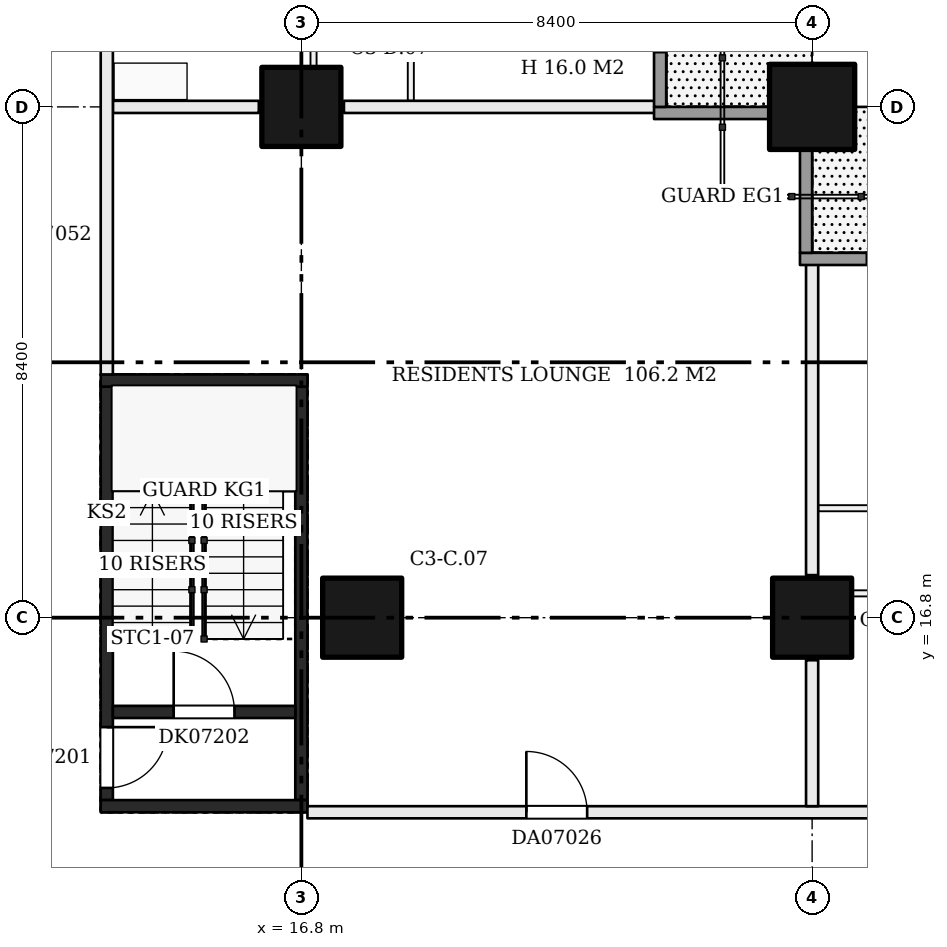
"""IFC4 building model, lengths in metres.
Left out: names, types, materials, properties, quantities, classifications, styles, units other than length and angle.
Written with IfcOpenShell. Run it as: python <this file> out.ifc"""

import sys

from ifc_helpers import new_model, si_unit, direction, frame, frame_2d, origin, origin_2d, place, context, subcontext, project, spatial, rectangle, extrude, element, fill, save


model = new_model("IFC4")
c1 = context("Model", 3, precision=1e-05, world=origin(), true_north=direction((0.0, 1.0)))
c2 = subcontext(c1, "Body", "Model", "MODEL_VIEW")
j1 = project(units=[si_unit("LENGTHUNIT", "METRE"), si_unit("PLANEANGLEUNIT", "RADIAN")], contexts=[c1])
p1 = place(None, origin())
s1 = spatial("IfcSite", under=j1, at=p1, CompositionType="ELEMENT")
p2 = place(p1, origin())
s2 = spatial("IfcBuilding", under=s1, at=p2, CompositionType="ELEMENT")
p3 = place(p2, frame((0.0, 0.0, 35.7)))
s3 = spatial("IfcBuildingStorey", under=s2, at=p3, CompositionType="ELEMENT", Elevation=35.7)
for number, where, z_axis, x_axis in (
    (1, (17.8, 16.8, 0.0), (0.0, 0.0, 1.0), (1.0, 0.0, 0.0)),
    (2, (16.8, 25.2, 0.0), (0.0, 0.0, 1.0), (1.0, 0.0, 0.0)),
    (3, (25.2, 16.8, 0.0), (0.0, 0.0, 1.0), (1.0, 0.0, 0.0)),
):
    element("IfcColumn", number, at=place(p3, frame(where, z_axis=z_axis, x_axis=x_axis)), inside=s3, PredefinedType="COLUMN", context=c2, shape_type="SweptSolid", body=[
        extrude(rectangle(XDim=1.3, YDim=1.3, at=origin_2d()), origin(), (0.0, 0.0, 1.0), 3.22),
    ])
p4 = place(p3, frame((25.2, 25.2, 0.0), z_axis=(0.0, 0.0, 1.0), x_axis=(1.0, 0.0, 0.0)))
e4 = element("IfcColumn", 4, at=p4, inside=s3, PredefinedType="COLUMN", context=c2, shape_type="SweptSolid", body=[
    extrude(rectangle(XDim=1.4, YDim=1.4, at=origin_2d()), origin(), (0.0, 0.0, 1.0), 3.22),
])
p5 = place(p3, frame((13.6, 13.8, 0.0), z_axis=(0.0, 0.0, 1.0), x_axis=(0.0, 1.0, 0.0)))
e5 = element("IfcWall", 5, at=p5, inside=s3, PredefinedType="SHEAR", context=c2, shape_type="SweptSolid", body=[
    extrude(rectangle(XDim=6.8, YDim=0.2, at=frame_2d((3.4, 0.0))), origin(), (0.0, 0.0, 1.0), 3.22),
])
p6 = place(p5, frame((0.2, 0.0, 0.0)))
e6 = element("IfcOpeningElement", 6, at=p6, cuts=e5, PredefinedType="OPENING", context=c2, shape_type="SweptSolid", body=[
    extrude(rectangle(XDim=1.0, YDim=2.1, at=frame_2d((0.5, 1.05))), frame((0.0, 0.11, 0.0), z_axis=(0.0, -1.0, 0.0), x_axis=(1.0, 0.0, 0.0)), (0.0, 0.0, 1.0), 0.22),
])
p7 = place(p3, frame((16.8, 13.8, 0.0), z_axis=(0.0, 0.0, 1.0), x_axis=(0.0, 1.0, 0.0)))
e7 = element("IfcWall", 7, at=p7, inside=s3, PredefinedType="SHEAR", context=c2, shape_type="SweptSolid", body=[
    extrude(rectangle(XDim=6.8, YDim=0.2, at=frame_2d((3.4, 0.0))), origin(), (0.0, 0.0, 1.0), 3.22),
])
for number, where, z_axis, x_axis in (
    (8, (13.5, 13.7, 0.0), (0.0, 0.0, 1.0), (1.0, 0.0, 0.0)),
    (9, (13.5, 20.7, 0.0), (0.0, 0.0, 1.0), (1.0, 0.0, 0.0)),
):
    element("IfcWall", number, at=place(p3, frame(where, z_axis=z_axis, x_axis=x_axis)), inside=s3, PredefinedType="SHEAR", context=c2, shape_type="SweptSolid", body=[
        extrude(rectangle(XDim=3.4, YDim=0.2, at=frame_2d((1.7, 0.0))), origin(), (0.0, 0.0, 1.0), 3.22),
    ])
p8 = place(p3, frame((13.7, 15.25, 0.0), z_axis=(0.0, 0.0, 1.0), x_axis=(1.0, 0.0, 0.0)))
e10 = element("IfcWall", 10, at=p8, inside=s3, PredefinedType="SHEAR", context=c2, shape_type="SweptSolid", body=[
    extrude(rectangle(XDim=3.0, YDim=0.2, at=frame_2d((1.5, 0.0))), origin(), (0.0, 0.0, 1.0), 3.22),
])
p9 = place(p8, frame((1.0, 0.0, 0.0)))
e11 = element("IfcOpeningElement", 11, at=p9, cuts=e10, PredefinedType="OPENING", context=c2, shape_type="SweptSolid", body=[
    extrude(rectangle(XDim=1.0, YDim=2.1, at=frame_2d((0.5, 1.05))), frame((0.0, 0.11, 0.0), z_axis=(0.0, -1.0, 0.0), x_axis=(1.0, 0.0, 0.0)), (0.0, 0.0, 1.0), 0.22),
])
p10 = place(p3, frame((16.9, 13.6, 0.0), z_axis=(0.0, 0.0, 1.0), x_axis=(1.0, 0.0, 0.0)))
e12 = element("IfcWall", 12, at=p10, inside=s3, PredefinedType="PARTITIONING", context=c2, shape_type="SweptSolid", body=[
    extrude(rectangle(XDim=25.1, YDim=0.2, at=frame_2d((12.55, 0.0))), origin(), (0.0, 0.0, 1.0), 3.22),
])
p11 = place(p10, frame((9.7, 0.0, 0.0)))
e13 = element("IfcOpeningElement", 13, at=p11, cuts=e12, PredefinedType="OPENING", context=c2, shape_type="SweptSolid", body=[
    extrude(rectangle(XDim=1.0, YDim=2.1, at=frame_2d((0.5, 1.05))), frame((0.0, 0.11, 0.0), z_axis=(0.0, -1.0, 0.0), x_axis=(1.0, 0.0, 0.0)), (0.0, 0.0, 1.0), 0.22),
])
p12 = place(p10, frame((23.64, 0.0, 0.0)))
e14 = element("IfcOpeningElement", 14, at=p12, cuts=e12, PredefinedType="OPENING", context=c2, shape_type="SweptSolid", body=[
    extrude(rectangle(XDim=1.0, YDim=2.1, at=frame_2d((0.5, 1.05))), frame((0.0, 0.11, 0.0), z_axis=(0.0, -1.0, 0.0), x_axis=(1.0, 0.0, 0.0)), (0.0, 0.0, 1.0), 0.22),
])
p13 = place(p10, frame((3.6, 0.0, 0.0)))
e15 = element("IfcOpeningElement", 15, at=p13, cuts=e12, PredefinedType="OPENING", context=c2, shape_type="SweptSolid", body=[
    extrude(rectangle(XDim=1.0, YDim=2.1, at=frame_2d((0.5, 1.05))), frame((0.0, 0.11, 0.0), z_axis=(0.0, -1.0, 0.0), x_axis=(1.0, 0.0, 0.0)), (0.0, 0.0, 1.0), 0.22),
])
p14 = place(p3, frame((25.3, 17.2, 0.0), z_axis=(0.0, 0.0, 1.0), x_axis=(1.0, 0.0, 0.0)))
e16 = element("IfcWall", 16, at=p14, inside=s3, PredefinedType="PARTITIONING", context=c2, shape_type="SweptSolid", body=[
    extrude(rectangle(XDim=12.4, YDim=0.1, at=frame_2d((6.2, 0.0))), origin(), (0.0, 0.0, 1.0), 3.22),
])
p15 = place(p14, frame((1.4, 0.0, 0.0)))
e17 = element("IfcOpeningElement", 17, at=p15, cuts=e16, PredefinedType="OPENING", context=c2, shape_type="SweptSolid", body=[
    extrude(rectangle(XDim=0.9, YDim=2.1, at=frame_2d((0.45, 1.05))), frame((0.0, 0.06, 0.0), z_axis=(0.0, -1.0, 0.0), x_axis=(1.0, 0.0, 0.0)), (0.0, 0.0, 1.0), 0.12),
])
p16 = place(p14, frame((5.667, 0.0, 0.0)))
e18 = element("IfcOpeningElement", 18, at=p16, cuts=e16, PredefinedType="OPENING", context=c2, shape_type="SweptSolid", body=[
    extrude(rectangle(XDim=0.9, YDim=2.1, at=frame_2d((0.45, 1.05))), frame((0.0, 0.06, 0.0), z_axis=(0.0, -1.0, 0.0), x_axis=(1.0, 0.0, 0.0)), (0.0, 0.0, 1.0), 0.12),
])
p17 = place(p14, frame((10.033, 0.0, 0.0)))
e19 = element("IfcOpeningElement", 19, at=p17, cuts=e16, PredefinedType="OPENING", context=c2, shape_type="SweptSolid", body=[
    extrude(rectangle(XDim=0.9, YDim=2.1, at=frame_2d((0.45, 1.05))), frame((0.0, 0.06, 0.0), z_axis=(0.0, -1.0, 0.0), x_axis=(1.0, 0.0, 0.0)), (0.0, 0.0, 1.0), 0.12),
])
p18 = place(p3, frame((25.3, 18.6, 0.0), z_axis=(0.0, 0.0, 1.0), x_axis=(1.0, 0.0, 0.0)))
e20 = element("IfcWall", 20, at=p18, inside=s3, PredefinedType="PARTITIONING", context=c2, shape_type="SweptSolid", body=[
    extrude(rectangle(XDim=12.4, YDim=0.1, at=frame_2d((6.2, 0.0))), origin(), (0.0, 0.0, 1.0), 3.22),
])
p19 = place(p18, frame((1.5, 0.0, 0.0)))
e21 = element("IfcOpeningElement", 21, at=p19, cuts=e20, PredefinedType="OPENING", context=c2, shape_type="SweptSolid", body=[
    extrude(rectangle(XDim=0.9, YDim=2.1, at=frame_2d((0.45, 1.05))), frame((0.0, 0.06, 0.0), z_axis=(0.0, -1.0, 0.0), x_axis=(1.0, 0.0, 0.0)), (0.0, 0.0, 1.0), 0.12),
])
p20 = place(p18, frame((5.7, 0.0, 0.0)))
e22 = element("IfcOpeningElement", 22, at=p20, cuts=e20, PredefinedType="OPENING", context=c2, shape_type="SweptSolid", body=[
    extrude(rectangle(XDim=0.9, YDim=2.1, at=frame_2d((0.45, 1.05))), frame((0.0, 0.06, 0.0), z_axis=(0.0, -1.0, 0.0), x_axis=(1.0, 0.0, 0.0)), (0.0, 0.0, 1.0), 0.12),
])
p21 = place(p18, frame((9.9, 0.0, 0.0)))
e23 = element("IfcOpeningElement", 23, at=p21, cuts=e20, PredefinedType="OPENING", context=c2, shape_type="SweptSolid", body=[
    extrude(rectangle(XDim=0.9, YDim=2.1, at=frame_2d((0.45, 1.05))), frame((0.0, 0.06, 0.0), z_axis=(0.0, -1.0, 0.0), x_axis=(1.0, 0.0, 0.0)), (0.0, 0.0, 1.0), 0.12),
])
p22 = place(p3, frame((13.7, 25.2, 0.0), z_axis=(0.0, 0.0, 1.0), x_axis=(1.0, 0.0, 0.0)))
e24 = element("IfcWall", 24, at=p22, inside=s3, PredefinedType="PARTITIONING", context=c2, shape_type="SweptSolid", body=[
    extrude(rectangle(XDim=2.4, YDim=0.2, at=frame_2d((1.2, 0.0))), origin(), (0.0, 0.0, 1.0), 3.22),
])
p23 = place(p3, frame((17.5, 25.2, 0.0), z_axis=(0.0, 0.0, 1.0), x_axis=(1.0, 0.0, 0.0)))
e25 = element("IfcWall", 25, at=p23, inside=s3, PredefinedType="PARTITIONING", context=c2, shape_type="SweptSolid", body=[
    extrude(rectangle(XDim=5.2, YDim=0.2, at=frame_2d((2.6, 0.0))), origin(), (0.0, 0.0, 1.0), 3.22),
])
p24 = place(p3, frame((13.6, 20.8, 0.0), z_axis=(0.0, 0.0, 1.0), x_axis=(0.0, 1.0, 0.0)))
e26 = element("IfcWall", 26, at=p24, inside=s3, PredefinedType="PARTITIONING", context=c2, shape_type="SweptSolid", body=[
    extrude(rectangle(XDim=21.2, YDim=0.2, at=frame_2d((10.6, 0.0))), origin(), (0.0, 0.0, 1.0), 3.22),
])
p25 = place(p24, frame((10.467, 0.0, 0.0)))
e27 = element("IfcOpeningElement", 27, at=p25, cuts=e26, PredefinedType="OPENING", context=c2, shape_type="SweptSolid", body=[
    extrude(rectangle(XDim=1.0, YDim=2.1, at=frame_2d((0.5, 1.05))), frame((0.0, 0.11, 0.0), z_axis=(0.0, -1.0, 0.0), x_axis=(1.0, 0.0, 0.0)), (0.0, 0.0, 1.0), 0.22),
])
p26 = place(p24, frame((19.74, 0.0, 0.0)))
e28 = element("IfcOpeningElement", 28, at=p26, cuts=e26, PredefinedType="OPENING", context=c2, shape_type="SweptSolid", body=[
    extrude(rectangle(XDim=1.0, YDim=2.1, at=frame_2d((0.5, 1.05))), frame((0.0, 0.11, 0.0), z_axis=(0.0, -1.0, 0.0), x_axis=(1.0, 0.0, 0.0)), (0.0, 0.0, 1.0), 0.22),
])
p27 = place(p3, frame((17.0, 25.3, 0.0), z_axis=(0.0, 0.0, 1.0), x_axis=(0.0, 1.0, 0.0)))
e29 = element("IfcWall", 29, at=p27, inside=s3, PredefinedType="PARTITIONING", context=c2, shape_type="SweptSolid", body=[
    extrude(rectangle(XDim=12.4, YDim=0.1, at=frame_2d((6.2, 0.0))), origin(), (0.0, 0.0, 1.0), 3.22),
])
p28 = place(p27, frame((6.067, 0.0, 0.0)))
e30 = element("IfcOpeningElement", 30, at=p28, cuts=e29, PredefinedType="OPENING", context=c2, shape_type="SweptSolid", body=[
    extrude(rectangle(XDim=0.9, YDim=2.1, at=frame_2d((0.45, 1.05))), frame((0.0, 0.06, 0.0), z_axis=(0.0, -1.0, 0.0), x_axis=(1.0, 0.0, 0.0)), (0.0, 0.0, 1.0), 0.12),
])
p29 = place(p27, frame((1.8, 0.0, 0.0)))
e31 = element("IfcOpeningElement", 31, at=p29, cuts=e29, PredefinedType="OPENING", context=c2, shape_type="SweptSolid", body=[
    extrude(rectangle(XDim=0.9, YDim=2.1, at=frame_2d((0.45, 1.05))), frame((0.0, 0.06, 0.0), z_axis=(0.0, -1.0, 0.0), x_axis=(1.0, 0.0, 0.0)), (0.0, 0.0, 1.0), 0.12),
])
p30 = place(p27, frame((10.033, 0.0, 0.0)))
e32 = element("IfcOpeningElement", 32, at=p30, cuts=e29, PredefinedType="OPENING", context=c2, shape_type="SweptSolid", body=[
    extrude(rectangle(XDim=0.9, YDim=2.1, at=frame_2d((0.45, 1.05))), frame((0.0, 0.06, 0.0), z_axis=(0.0, -1.0, 0.0), x_axis=(1.0, 0.0, 0.0)), (0.0, 0.0, 1.0), 0.12),
])
p31 = place(p3, frame((18.6, 25.3, 0.0), z_axis=(0.0, 0.0, 1.0), x_axis=(0.0, 1.0, 0.0)))
e33 = element("IfcWall", 33, at=p31, inside=s3, PredefinedType="PARTITIONING", context=c2, shape_type="SweptSolid", body=[
    extrude(rectangle(XDim=12.4, YDim=0.1, at=frame_2d((6.2, 0.0))), origin(), (0.0, 0.0, 1.0), 3.22),
])
p32 = place(p31, frame((1.5, 0.0, 0.0)))
e34 = element("IfcOpeningElement", 34, at=p32, cuts=e33, PredefinedType="OPENING", context=c2, shape_type="SweptSolid", body=[
    extrude(rectangle(XDim=0.9, YDim=2.1, at=frame_2d((0.45, 1.05))), frame((0.0, 0.06, 0.0), z_axis=(0.0, -1.0, 0.0), x_axis=(1.0, 0.0, 0.0)), (0.0, 0.0, 1.0), 0.12),
])
p33 = place(p31, frame((6.9, 0.0, 0.0)))
e35 = element("IfcOpeningElement", 35, at=p33, cuts=e33, PredefinedType="OPENING", context=c2, shape_type="SweptSolid", body=[
    extrude(rectangle(XDim=0.9, YDim=2.1, at=frame_2d((0.45, 1.05))), frame((0.0, 0.06, 0.0), z_axis=(0.0, -1.0, 0.0), x_axis=(1.0, 0.0, 0.0)), (0.0, 0.0, 1.0), 0.12),
])
p34 = place(p3, frame((25.2, 13.7, 0.0), z_axis=(0.0, 0.0, 1.0), x_axis=(0.0, 1.0, 0.0)))
e36 = element("IfcWall", 36, at=p34, inside=s3, PredefinedType="PARTITIONING", context=c2, shape_type="SweptSolid", body=[
    extrude(rectangle(XDim=2.4, YDim=0.2, at=frame_2d((1.2, 0.0))), origin(), (0.0, 0.0, 1.0), 3.22),
])
p35 = place(p3, frame((25.2, 17.5, 0.0), z_axis=(0.0, 0.0, 1.0), x_axis=(0.0, 1.0, 0.0)))
e37 = element("IfcWall", 37, at=p35, inside=s3, PredefinedType="PARTITIONING", context=c2, shape_type="SweptSolid", body=[
    extrude(rectangle(XDim=5.2, YDim=0.2, at=frame_2d((2.6, 0.0))), origin(), (0.0, 0.0, 1.0), 3.22),
])
p36 = place(p3, frame((42.0, 22.7, 0.0), z_axis=(0.0, 0.0, 1.0), x_axis=(-1.0, 0.0, 0.0)))
e38 = element("IfcWall", 38, at=p36, inside=s3, PredefinedType="SOLIDWALL", context=c2, shape_type="SweptSolid", body=[
    extrude(rectangle(XDim=17.0, YDim=0.2, at=frame_2d((8.5, 0.0))), origin(), (0.0, 0.0, 1.0), 3.22),
])
p37 = place(p36, frame((13.5, 0.0, 0.0)))
e39 = element("IfcOpeningElement", 39, at=p37, cuts=e38, PredefinedType="OPENING", context=c2, shape_type="SweptSolid", body=[
    extrude(rectangle(XDim=2.4, YDim=2.2, at=frame_2d((1.2, 1.1))), frame((0.0, 0.11, 0.0), z_axis=(0.0, -1.0, 0.0), x_axis=(1.0, 0.0, 0.0)), (0.0, 0.0, 1.0), 0.22),
])
p38 = place(p36, frame((9.3, 0.0, 0.9)))
e40 = element("IfcOpeningElement", 40, at=p38, cuts=e38, PredefinedType="OPENING", context=c2, shape_type="SweptSolid", body=[
    extrude(rectangle(XDim=2.4, YDim=1.5, at=frame_2d((1.2, 0.75))), frame((0.0, 0.11, 0.0), z_axis=(0.0, -1.0, 0.0), x_axis=(1.0, 0.0, 0.0)), (0.0, 0.0, 1.0), 0.22),
])
p39 = place(p36, frame((5.1, 0.0, 0.9)))
e41 = element("IfcOpeningElement", 41, at=p39, cuts=e38, PredefinedType="OPENING", context=c2, shape_type="SweptSolid", body=[
    extrude(rectangle(XDim=2.4, YDim=1.5, at=frame_2d((1.2, 0.75))), frame((0.0, 0.11, 0.0), z_axis=(0.0, -1.0, 0.0), x_axis=(1.0, 0.0, 0.0)), (0.0, 0.0, 1.0), 0.22),
])
p40 = place(p36, frame((0.9, 0.0, 0.0)))
e42 = element("IfcOpeningElement", 42, at=p40, cuts=e38, PredefinedType="OPENING", context=c2, shape_type="SweptSolid", body=[
    extrude(rectangle(XDim=2.4, YDim=2.2, at=frame_2d((1.2, 1.1))), frame((0.0, 0.11, 0.0), z_axis=(0.0, -1.0, 0.0), x_axis=(1.0, 0.0, 0.0)), (0.0, 0.0, 1.0), 0.22),
])
p41 = place(p3, frame((25.1, 22.8, 0.0), z_axis=(0.0, 0.0, 1.0), x_axis=(0.0, 1.0, 0.0)))
e43 = element("IfcWall", 43, at=p41, inside=s3, PredefinedType="SOLIDWALL", context=c2, shape_type="SweptSolid", body=[
    extrude(rectangle(XDim=1.7, YDim=0.2, at=frame_2d((0.85, 0.0))), origin(), (0.0, 0.0, 1.0), 3.22),
])
p42 = place(p3, frame((24.5, 25.1, 0.0), z_axis=(0.0, 0.0, 1.0), x_axis=(-1.0, 0.0, 0.0)))
e44 = element("IfcWall", 44, at=p42, inside=s3, PredefinedType="SOLIDWALL", context=c2, shape_type="SweptSolid", body=[
    extrude(rectangle(XDim=1.9, YDim=0.2, at=frame_2d((0.95, 0.0))), origin(), (0.0, 0.0, 1.0), 3.22),
])
p43 = place(p3, frame((22.7, 25.2, 0.0), z_axis=(0.0, 0.0, 1.0), x_axis=(0.0, 1.0, 0.0)))
e45 = element("IfcWall", 45, at=p43, inside=s3, PredefinedType="SOLIDWALL", context=c2, shape_type="SweptSolid", body=[
    extrude(rectangle(XDim=16.8, YDim=0.2, at=frame_2d((8.4, 0.0))), origin(), (0.0, 0.0, 1.0), 3.22),
])
p44 = place(p43, frame((0.9, 0.0, 0.9)))
e46 = element("IfcOpeningElement", 46, at=p44, cuts=e45, PredefinedType="OPENING", context=c2, shape_type="SweptSolid", body=[
    extrude(rectangle(XDim=2.4, YDim=1.5, at=frame_2d((1.2, 0.75))), frame((0.0, 0.11, 0.0), z_axis=(0.0, -1.0, 0.0), x_axis=(1.0, 0.0, 0.0)), (0.0, 0.0, 1.0), 0.22),
])
p45 = place(p43, frame((5.1, 0.0, 0.0)))
e47 = element("IfcOpeningElement", 47, at=p45, cuts=e45, PredefinedType="OPENING", context=c2, shape_type="SweptSolid", body=[
    extrude(rectangle(XDim=2.4, YDim=2.2, at=frame_2d((1.2, 1.1))), frame((0.0, 0.11, 0.0), z_axis=(0.0, -1.0, 0.0), x_axis=(1.0, 0.0, 0.0)), (0.0, 0.0, 1.0), 0.22),
])
p46 = place(p43, frame((9.3, 0.0, 0.0)))
e48 = element("IfcOpeningElement", 48, at=p46, cuts=e45, PredefinedType="OPENING", context=c2, shape_type="SweptSolid", body=[
    extrude(rectangle(XDim=2.4, YDim=2.2, at=frame_2d((1.2, 1.1))), frame((0.0, 0.11, 0.0), z_axis=(0.0, -1.0, 0.0), x_axis=(1.0, 0.0, 0.0)), (0.0, 0.0, 1.0), 0.22),
])
p47 = place(p43, frame((13.5, 0.0, 0.0)))
e49 = element("IfcOpeningElement", 49, at=p47, cuts=e45, PredefinedType="OPENING", context=c2, shape_type="SweptSolid", body=[
    extrude(rectangle(XDim=2.4, YDim=2.2, at=frame_2d((1.2, 1.1))), frame((0.0, 0.11, 0.0), z_axis=(0.0, -1.0, 0.0), x_axis=(1.0, 0.0, 0.0)), (0.0, 0.0, 1.0), 0.22),
])
p48 = place(p6, frame((1.0, 0.0, 0.0), z_axis=(0.0, 0.0, 1.0), x_axis=(-1.0, 0.0, 0.0)))
e50 = element("IfcDoor", 50, at=p48, inside=s3, OperationType="SINGLE_SWING_LEFT", PredefinedType="DOOR", context=c2, shape_type="SweptSolid", body=[
    extrude(rectangle(XDim=1.0, YDim=2.1, at=frame_2d((0.5, 1.05))), frame((0.0, 0.025, 0.0), z_axis=(0.0, -1.0, 0.0), x_axis=(1.0, 0.0, 0.0)), (0.0, 0.0, 1.0), 0.05),
])
fill(e6, e50)
p49 = place(p9, origin())
e51 = element("IfcDoor", 51, at=p49, inside=s3, OperationType="SINGLE_SWING_LEFT", PredefinedType="DOOR", context=c2, shape_type="SweptSolid", body=[
    extrude(rectangle(XDim=1.0, YDim=2.1, at=frame_2d((0.5, 1.05))), frame((0.0, 0.025, 0.0), z_axis=(0.0, -1.0, 0.0), x_axis=(1.0, 0.0, 0.0)), (0.0, 0.0, 1.0), 0.05),
])
fill(e11, e51)
p50 = place(p13, origin())
e52 = element("IfcDoor", 52, at=p50, inside=s3, OperationType="SINGLE_SWING_LEFT", PredefinedType="DOOR", context=c2, shape_type="SweptSolid", body=[
    extrude(rectangle(XDim=1.0, YDim=2.1, at=frame_2d((0.5, 1.05))), frame((0.0, 0.025, 0.0), z_axis=(0.0, -1.0, 0.0), x_axis=(1.0, 0.0, 0.0)), (0.0, 0.0, 1.0), 0.05),
])
fill(e15, e52)
p51 = place(p44, origin())
e53 = element("IfcWindow", 53, at=p51, inside=s3, PartitioningType="SINGLE_PANEL", PredefinedType="WINDOW", context=c2, shape_type="SweptSolid", body=[
    extrude(rectangle(XDim=2.4, YDim=1.5, at=frame_2d((1.2, 0.75))), frame((0.0, 0.03, 0.0), z_axis=(0.0, -1.0, 0.0), x_axis=(1.0, 0.0, 0.0)), (0.0, 0.0, 1.0), 0.06),
])
fill(e46, e53)
save(model, sys.argv[1])
